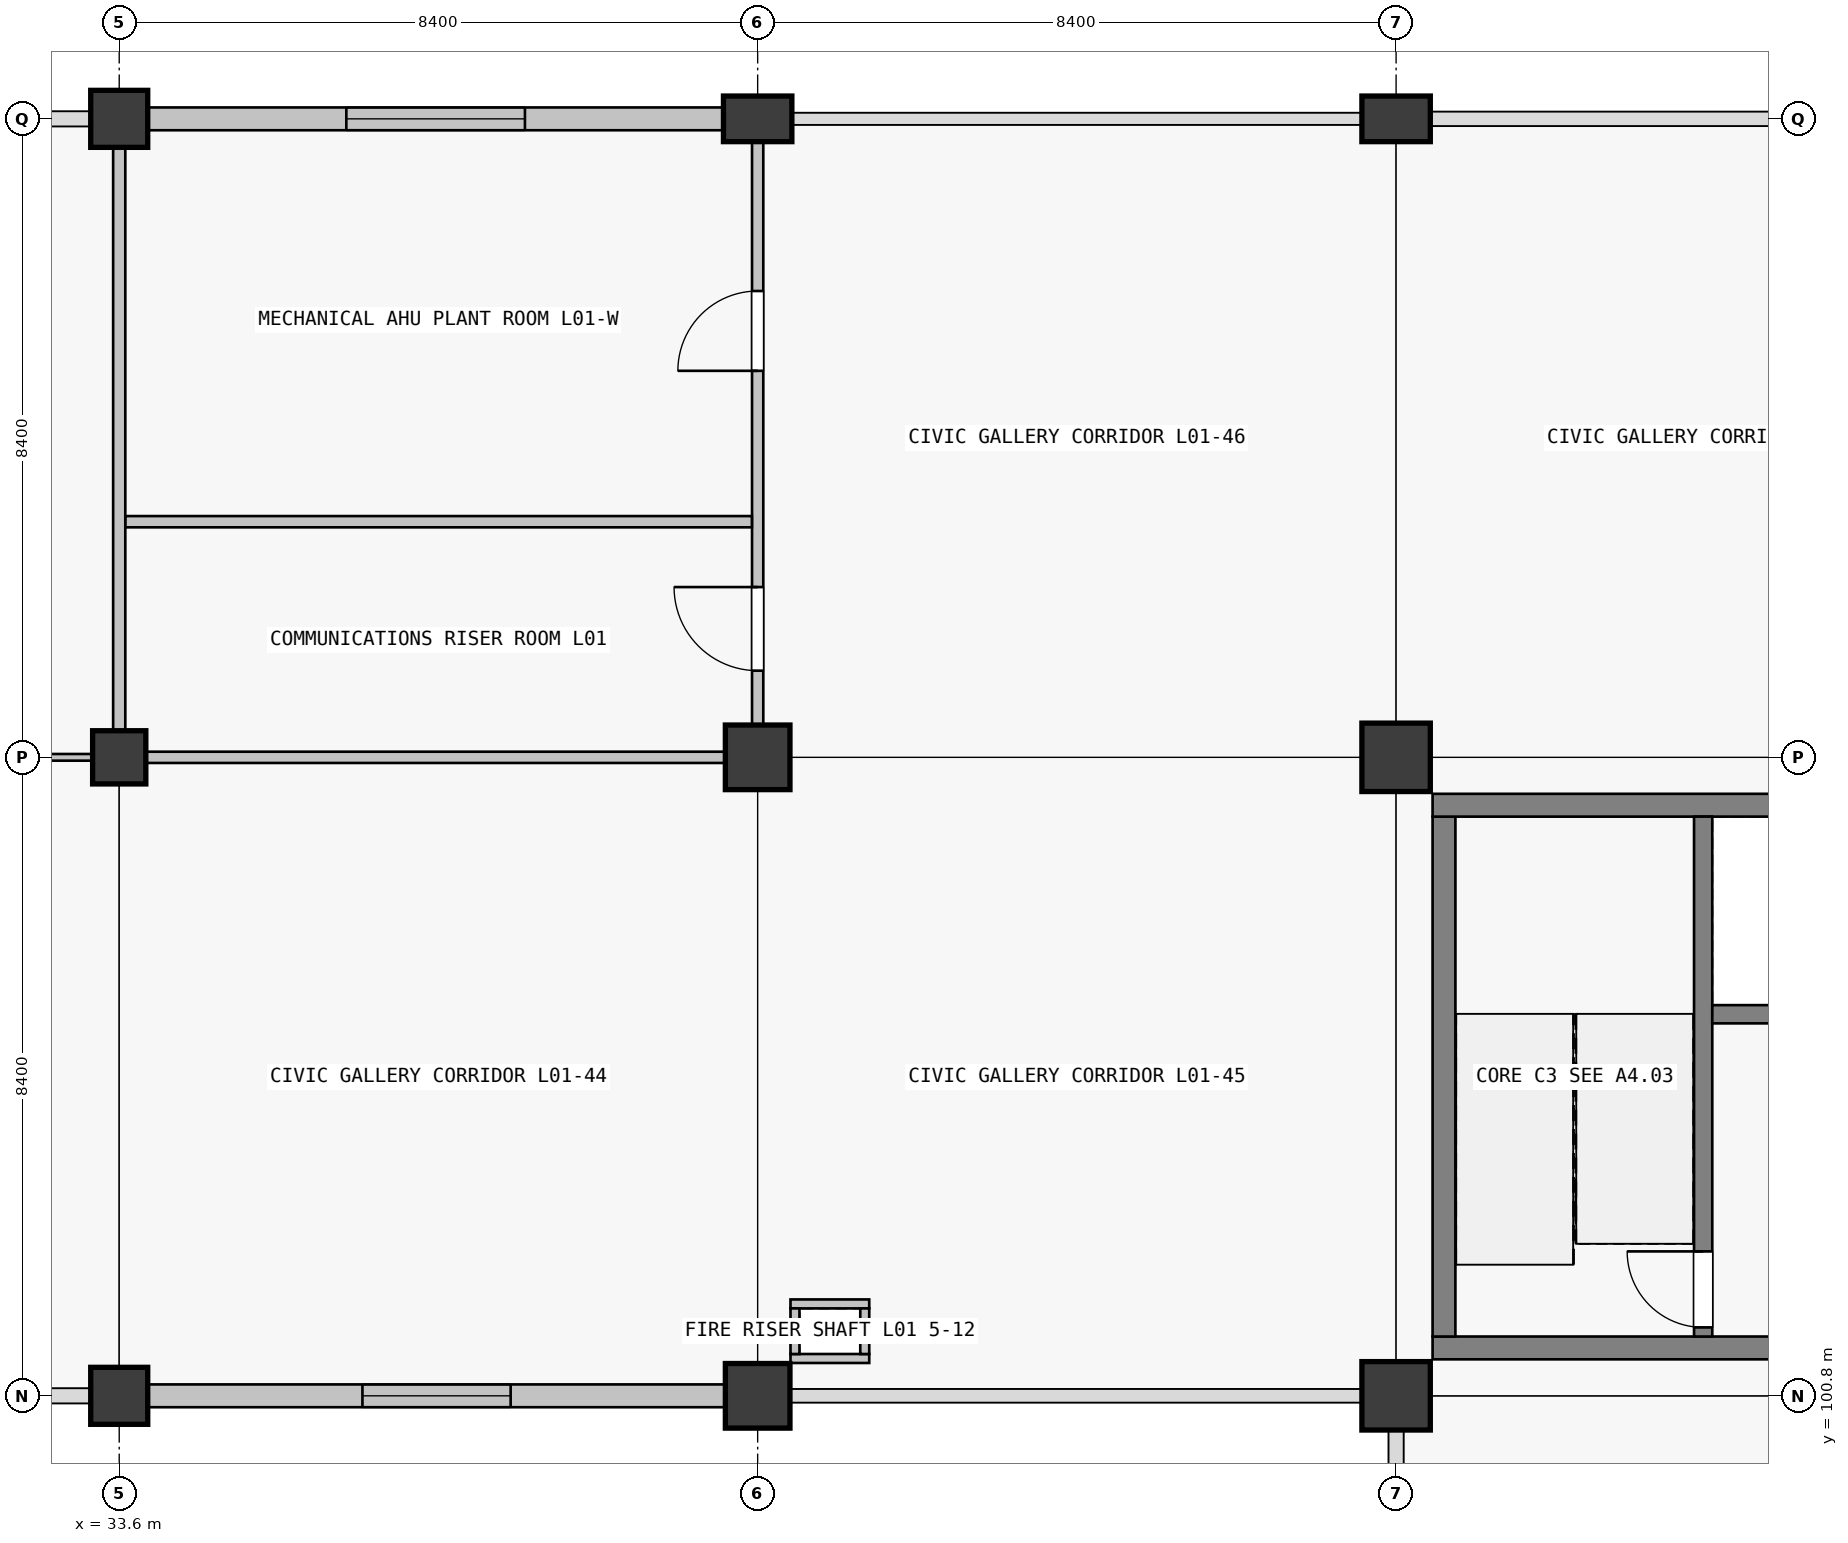
"""IFC4 building model, lengths in metres.
Left out: names, types, materials, properties, quantities, classifications, styles, units other than length and angle.
Written with IfcOpenShell. Run it as: python <this file> out.ifc"""

import sys

from ifc_helpers import new_model, si_unit, direction, frame, frame_2d, origin, origin_2d, place, context, subcontext, project, spatial, rectangle, extrude, element, fill, save


model = new_model("IFC4")
c1 = context("Model", 3, precision=1e-05, world=origin(), true_north=direction((0.0, 1.0)))
c2 = subcontext(c1, "Body", "Model", "MODEL_VIEW")
j1 = project(units=[si_unit("LENGTHUNIT", "METRE"), si_unit("PLANEANGLEUNIT", "RADIAN")], contexts=[c1])
p1 = place(None, origin())
s1 = spatial("IfcSite", under=j1, at=p1, CompositionType="ELEMENT")
p2 = place(p1, origin())
s2 = spatial("IfcBuilding", under=s1, at=p2, CompositionType="ELEMENT")
p3 = place(p2, frame((0.0, 0.0, 5.76)))
s3 = spatial("IfcBuildingStorey", under=s2, at=p3, CompositionType="ELEMENT", Elevation=5.76)
p4 = place(p3, frame((33.6, 100.8, 0.0), z_axis=(0.0, 0.0, 1.0), x_axis=(1.0, 0.0, 0.0)))
e1 = element("IfcColumn", 1, at=p4, inside=s3, PredefinedType="COLUMN", context=c2, shape_type="SweptSolid", body=[
    extrude(rectangle(XDim=0.75, YDim=0.75, at=origin_2d()), origin(), (0.0, 0.0, 1.0), 4.5),
])
p5 = place(p3, frame((33.6, 109.2, 0.0), z_axis=(0.0, 0.0, 1.0), x_axis=(1.0, 0.0, 0.0)))
e2 = element("IfcColumn", 2, at=p5, inside=s3, PredefinedType="COLUMN", context=c2, shape_type="SweptSolid", body=[
    extrude(rectangle(XDim=0.7, YDim=0.7, at=origin_2d()), origin(), (0.0, 0.0, 1.0), 4.5),
])
p6 = place(p3, frame((33.6, 117.6, 0.0), z_axis=(0.0, 0.0, 1.0), x_axis=(1.0, 0.0, 0.0)))
e3 = element("IfcColumn", 3, at=p6, inside=s3, PredefinedType="COLUMN", context=c2, shape_type="SweptSolid", body=[
    extrude(rectangle(XDim=0.75, YDim=0.75, at=origin_2d()), origin(), (0.0, 0.0, 1.0), 4.5),
])
for number, where, z_axis, x_axis in (
    (4, (42.0, 100.8, 0.0), (0.0, 0.0, 1.0), (1.0, 0.0, 0.0)),
    (5, (42.0, 109.2, 0.0), (0.0, 0.0, 1.0), (1.0, 0.0, 0.0)),
):
    element("IfcColumn", number, at=place(p3, frame(where, z_axis=z_axis, x_axis=x_axis)), inside=s3, PredefinedType="COLUMN", context=c2, shape_type="SweptSolid", body=[
        extrude(rectangle(XDim=0.85, YDim=0.85, at=origin_2d()), origin(), (0.0, 0.0, 1.0), 4.5),
    ])
p7 = place(p3, frame((42.0, 117.6, 0.0), z_axis=(0.0, 0.0, 1.0), x_axis=(1.0, 0.0, 0.0)))
e6 = element("IfcColumn", 6, at=p7, inside=s3, PredefinedType="COLUMN", context=c2, shape_type="SweptSolid", body=[
    extrude(rectangle(XDim=0.9, YDim=0.6, at=origin_2d()), origin(), (0.0, 0.0, 1.0), 4.5),
])
for number, where, z_axis, x_axis in (
    (7, (50.4, 100.8, 0.0), (0.0, 0.0, 1.0), (1.0, 0.0, 0.0)),
    (8, (50.4, 109.2, 0.0), (0.0, 0.0, 1.0), (1.0, 0.0, 0.0)),
):
    element("IfcColumn", number, at=place(p3, frame(where, z_axis=z_axis, x_axis=x_axis)), inside=s3, PredefinedType="COLUMN", context=c2, shape_type="SweptSolid", body=[
        extrude(rectangle(XDim=0.9, YDim=0.9, at=origin_2d()), origin(), (0.0, 0.0, 1.0), 4.5),
    ])
p8 = place(p3, frame((50.4, 117.6, 0.0), z_axis=(0.0, 0.0, 1.0), x_axis=(1.0, 0.0, 0.0)))
e9 = element("IfcColumn", 9, at=p8, inside=s3, PredefinedType="COLUMN", context=c2, shape_type="SweptSolid", body=[
    extrude(rectangle(XDim=0.9, YDim=0.6, at=origin_2d()), origin(), (0.0, 0.0, 1.0), 4.5),
])
p9 = place(p3, frame((41.574, 100.8, 0.0), z_axis=(0.0, 0.0, 1.0), x_axis=(-1.0, 0.0, 0.0)))
e10 = element("IfcWall", 10, at=p9, inside=s3, PredefinedType="SOLIDWALL", context=c2, shape_type="SweptSolid", body=[
    extrude(rectangle(XDim=7.598, YDim=0.3, at=frame_2d((3.799, 0.0))), origin(), (0.0, 0.0, 1.0), 3.4),
])
p10 = place(p9, frame((2.824, 0.0, 0.9)))
e11 = element("IfcOpeningElement", 11, at=p10, cuts=e10, PredefinedType="OPENING", context=c2, shape_type="SweptSolid", body=[
    extrude(rectangle(XDim=1.95, YDim=1.6, at=frame_2d((0.975, 0.8))), frame((0.0, 0.15, 0.0), z_axis=(0.0, -1.0, 0.0), x_axis=(1.0, 0.0, 0.0)), (0.0, 0.0, 1.0), 0.3),
])
p11 = place(p3, frame((33.976, 117.6, 0.0), z_axis=(0.0, 0.0, 1.0), x_axis=(1.0, 0.0, 0.0)))
e12 = element("IfcWall", 12, at=p11, inside=s3, PredefinedType="SOLIDWALL", context=c2, shape_type="SweptSolid", body=[
    extrude(rectangle(XDim=7.573, YDim=0.3, at=frame_2d((3.787, 0.0))), origin(), (0.0, 0.0, 1.0), 3.4),
])
p12 = place(p11, frame((2.612, 0.0, 0.9)))
e13 = element("IfcOpeningElement", 13, at=p12, cuts=e12, PredefinedType="OPENING", context=c2, shape_type="SweptSolid", body=[
    extrude(rectangle(XDim=2.35, YDim=1.6, at=frame_2d((1.175, 0.8))), frame((0.0, 0.15, 0.0), z_axis=(0.0, -1.0, 0.0), x_axis=(1.0, 0.0, 0.0)), (0.0, 0.0, 1.0), 0.3),
])
p13 = place(p3, frame((58.32, 101.43, 0.0), z_axis=(0.0, 0.0, 1.0), x_axis=(-1.0, 0.0, 0.0)))
e14 = element("IfcWall", 14, at=p13, inside=s3, PredefinedType="SHEAR", context=c2, shape_type="SweptSolid", body=[
    extrude(rectangle(XDim=7.44, YDim=0.3, at=frame_2d((3.72, 0.0))), origin(), (0.0, 0.0, 1.0), 4.5),
])
p14 = place(p13, frame((1.28, 0.0, 0.0)))
e15 = element("IfcOpeningElement", 15, at=p14, cuts=e14, PredefinedType="OPENING", context=c2, shape_type="SweptSolid", body=[
    extrude(rectangle(XDim=1.5, YDim=2.15, at=frame_2d((0.75, 1.075))), frame((0.0, 0.15, 0.0), z_axis=(0.0, -1.0, 0.0), x_axis=(1.0, 0.0, 0.0)), (0.0, 0.0, 1.0), 0.3),
])
p15 = place(p3, frame((51.03, 101.58, 0.0), z_axis=(0.0, 0.0, 1.0), x_axis=(0.0, 1.0, 0.0)))
e16 = element("IfcWall", 16, at=p15, inside=s3, PredefinedType="SHEAR", context=c2, shape_type="SweptSolid", body=[
    extrude(rectangle(XDim=6.84, YDim=0.3, at=frame_2d((3.42, 0.0))), origin(), (0.0, 0.0, 1.0), 4.5),
])
p16 = place(p3, frame((50.88, 108.57, 0.0), z_axis=(0.0, 0.0, 1.0), x_axis=(1.0, 0.0, 0.0)))
e17 = element("IfcWall", 17, at=p16, inside=s3, PredefinedType="SHEAR", context=c2, shape_type="SweptSolid", body=[
    extrude(rectangle(XDim=7.44, YDim=0.3, at=frame_2d((3.72, 0.0))), origin(), (0.0, 0.0, 1.0), 4.5),
])
p17 = place(p3, frame((54.44, 101.58, 0.0), z_axis=(0.0, 0.0, 1.0), x_axis=(0.0, 1.0, 0.0)))
e18 = element("IfcWall", 18, at=p17, inside=s3, PredefinedType="SHEAR", context=c2, shape_type="SweptSolid", body=[
    extrude(rectangle(XDim=6.84, YDim=0.24, at=frame_2d((3.42, 0.0))), origin(), (0.0, 0.0, 1.0), 4.5),
])
p18 = place(p17, frame((0.12, 0.0, 0.0)))
e19 = element("IfcOpeningElement", 19, at=p18, cuts=e18, PredefinedType="OPENING", context=c2, shape_type="SweptSolid", body=[
    extrude(rectangle(XDim=1.0, YDim=2.15, at=frame_2d((0.5, 1.075))), frame((0.0, 0.12, 0.0), z_axis=(0.0, -1.0, 0.0), x_axis=(1.0, 0.0, 0.0)), (0.0, 0.0, 1.0), 0.24),
])
p19 = place(p3, frame((54.56, 105.82, 0.0), z_axis=(0.0, 0.0, 1.0), x_axis=(1.0, 0.0, 0.0)))
e20 = element("IfcWall", 20, at=p19, inside=s3, PredefinedType="SHEAR", context=c2, shape_type="SweptSolid", body=[
    extrude(rectangle(XDim=3.46, YDim=0.24, at=frame_2d((1.73, 0.0))), origin(), (0.0, 0.0, 1.0), 4.5),
])
p20 = place(p19, frame((1.13, 0.0, 0.0)))
e21 = element("IfcOpeningElement", 21, at=p20, cuts=e20, PredefinedType="OPENING", context=c2, shape_type="SweptSolid", body=[
    extrude(rectangle(XDim=1.2, YDim=2.2, at=frame_2d((0.6, 1.1))), frame((0.0, 0.12, 0.0), z_axis=(0.0, -1.0, 0.0), x_axis=(1.0, 0.0, 0.0)), (0.0, 0.0, 1.0), 0.24),
])
for number, where, z_axis, x_axis in (
    (22, (42.432, 101.291, 0.0), (0.0, 0.0, 1.0), (1.0, 0.0, 0.0)),
    (23, (42.432, 102.009, 0.0), (0.0, 0.0, 1.0), (1.0, 0.0, 0.0)),
):
    element("IfcWall", number, at=place(p3, frame(where, z_axis=z_axis, x_axis=x_axis)), inside=s3, PredefinedType="PARTITIONING", context=c2, shape_type="SweptSolid", body=[
        extrude(rectangle(XDim=1.036, YDim=0.118, at=frame_2d((0.518, 0.0))), origin(), (0.0, 0.0, 1.0), 3.48),
    ])
for number, where, z_axis, x_axis in (
    (24, (42.491, 101.35, 0.0), (0.0, 0.0, 1.0), (0.0, 1.0, 0.0)),
    (25, (43.409, 101.35, 0.0), (0.0, 0.0, 1.0), (0.0, 1.0, 0.0)),
):
    element("IfcWall", number, at=place(p3, frame(where, z_axis=z_axis, x_axis=x_axis)), inside=s3, PredefinedType="PARTITIONING", context=c2, shape_type="SweptSolid", body=[
        extrude(rectangle(XDim=0.6, YDim=0.118, at=frame_2d((0.3, 0.0))), origin(), (0.0, 0.0, 1.0), 3.48),
    ])
p21 = place(p3, frame((25.577, 109.2, 0.0), z_axis=(0.0, 0.0, 1.0), x_axis=(1.0, 0.0, 0.0)))
e26 = element("IfcWall", 26, at=p21, inside=s3, PredefinedType="PARTITIONING", context=c2, shape_type="SweptSolid", body=[
    extrude(rectangle(XDim=7.671, YDim=0.088, at=frame_2d((3.835, 0.0))), origin(), (0.0, 0.0, 1.0), 2.4),
])
p22 = place(p21, frame((3.351, 0.0, 0.0)))
e27 = element("IfcOpeningElement", 27, at=p22, cuts=e26, PredefinedType="OPENING", context=c2, shape_type="SweptSolid", body=[
    extrude(rectangle(XDim=0.97, YDim=2.12, at=frame_2d((0.485, 1.06))), frame((0.0, 0.044, 0.0), z_axis=(0.0, -1.0, 0.0), x_axis=(1.0, 0.0, 0.0)), (0.0, 0.0, 1.0), 0.088),
])
p23 = place(p3, frame((33.952, 109.2, 0.0), z_axis=(0.0, 0.0, 1.0), x_axis=(1.0, 0.0, 0.0)))
e28 = element("IfcWall", 28, at=p23, inside=s3, PredefinedType="PARTITIONING", context=c2, shape_type="SweptSolid", body=[
    extrude(rectangle(XDim=7.621, YDim=0.148, at=frame_2d((3.811, 0.0))), origin(), (0.0, 0.0, 1.0), 2.4),
])
p24 = place(p3, frame((33.6, 109.552, 0.0), z_axis=(0.0, 0.0, 1.0), x_axis=(0.0, 1.0, 0.0)))
e29 = element("IfcWall", 29, at=p24, inside=s3, PredefinedType="PARTITIONING", context=c2, shape_type="SweptSolid", body=[
    extrude(rectangle(XDim=7.671, YDim=0.16, at=frame_2d((3.835, 0.0))), origin(), (0.0, 0.0, 1.0), 2.4),
])
p25 = place(p3, frame((42.0, 109.627, 0.0), z_axis=(0.0, 0.0, 1.0), x_axis=(0.0, 1.0, 0.0)))
e30 = element("IfcWall", 30, at=p25, inside=s3, PredefinedType="PARTITIONING", context=c2, shape_type="SweptSolid", body=[
    extrude(rectangle(XDim=7.671, YDim=0.148, at=frame_2d((3.835, 0.0))), origin(), (0.0, 0.0, 1.0), 2.4),
])
p26 = place(p25, frame((0.713, 0.0, 0.0)))
e31 = element("IfcOpeningElement", 31, at=p26, cuts=e30, PredefinedType="OPENING", context=c2, shape_type="SweptSolid", body=[
    extrude(rectangle(XDim=1.1, YDim=2.15, at=frame_2d((0.55, 1.075))), frame((0.0, 0.074, 0.0), z_axis=(0.0, -1.0, 0.0), x_axis=(1.0, 0.0, 0.0)), (0.0, 0.0, 1.0), 0.148),
])
p27 = place(p25, frame((4.658, 0.0, 0.0)))
e32 = element("IfcOpeningElement", 32, at=p27, cuts=e30, PredefinedType="OPENING", context=c2, shape_type="SweptSolid", body=[
    extrude(rectangle(XDim=1.05, YDim=2.15, at=frame_2d((0.525, 1.075))), frame((0.0, 0.074, 0.0), z_axis=(0.0, -1.0, 0.0), x_axis=(1.0, 0.0, 0.0)), (0.0, 0.0, 1.0), 0.148),
])
p28 = place(p3, frame((33.682, 112.3, 0.0), z_axis=(0.0, 0.0, 1.0), x_axis=(1.0, 0.0, 0.0)))
e33 = element("IfcWall", 33, at=p28, inside=s3, PredefinedType="PARTITIONING", context=c2, shape_type="SweptSolid", body=[
    extrude(rectangle(XDim=8.242, YDim=0.148, at=frame_2d((4.121, 0.0))), origin(), (0.0, 0.0, 1.0), 2.4),
])
p29 = place(p10, origin())
e34 = element("IfcWindow", 34, at=p29, inside=s3, PartitioningType="SINGLE_PANEL", PredefinedType="WINDOW", context=c2, shape_type="SweptSolid", body=[
    extrude(rectangle(XDim=1.95, YDim=1.6, at=frame_2d((0.975, 0.8))), frame((0.0, 0.03, 0.0), z_axis=(0.0, -1.0, 0.0), x_axis=(1.0, 0.0, 0.0)), (0.0, 0.0, 1.0), 0.06),
])
fill(e11, e34)
p30 = place(p12, origin())
e35 = element("IfcWindow", 35, at=p30, inside=s3, PartitioningType="SINGLE_PANEL", PredefinedType="WINDOW", context=c2, shape_type="SweptSolid", body=[
    extrude(rectangle(XDim=2.35, YDim=1.6, at=frame_2d((1.175, 0.8))), frame((0.0, 0.03, 0.0), z_axis=(0.0, -1.0, 0.0), x_axis=(1.0, 0.0, 0.0)), (0.0, 0.0, 1.0), 0.06),
])
fill(e13, e35)
p31 = place(p18, origin())
e36 = element("IfcDoor", 36, at=p31, inside=s3, OperationType="SINGLE_SWING_RIGHT", PredefinedType="DOOR", context=c2, shape_type="SweptSolid", body=[
    extrude(rectangle(XDim=1.0, YDim=2.15, at=frame_2d((0.5, 1.075))), frame((0.0, 0.025, 0.0), z_axis=(0.0, -1.0, 0.0), x_axis=(1.0, 0.0, 0.0)), (0.0, 0.0, 1.0), 0.05),
])
fill(e19, e36)
p32 = place(p26, origin())
e37 = element("IfcDoor", 37, at=p32, inside=s3, OperationType="SINGLE_SWING_RIGHT", PredefinedType="DOOR", context=c2, shape_type="SweptSolid", body=[
    extrude(rectangle(XDim=1.1, YDim=2.15, at=frame_2d((0.55, 1.075))), frame((0.0, 0.025, 0.0), z_axis=(0.0, -1.0, 0.0), x_axis=(1.0, 0.0, 0.0)), (0.0, 0.0, 1.0), 0.05),
])
fill(e31, e37)
p33 = place(p27, origin())
e38 = element("IfcDoor", 38, at=p33, inside=s3, OperationType="SINGLE_SWING_LEFT", PredefinedType="DOOR", context=c2, shape_type="SweptSolid", body=[
    extrude(rectangle(XDim=1.05, YDim=2.15, at=frame_2d((0.525, 1.075))), frame((0.0, 0.025, 0.0), z_axis=(0.0, -1.0, 0.0), x_axis=(1.0, 0.0, 0.0)), (0.0, 0.0, 1.0), 0.05),
])
fill(e32, e38)
save(model, sys.argv[1])
